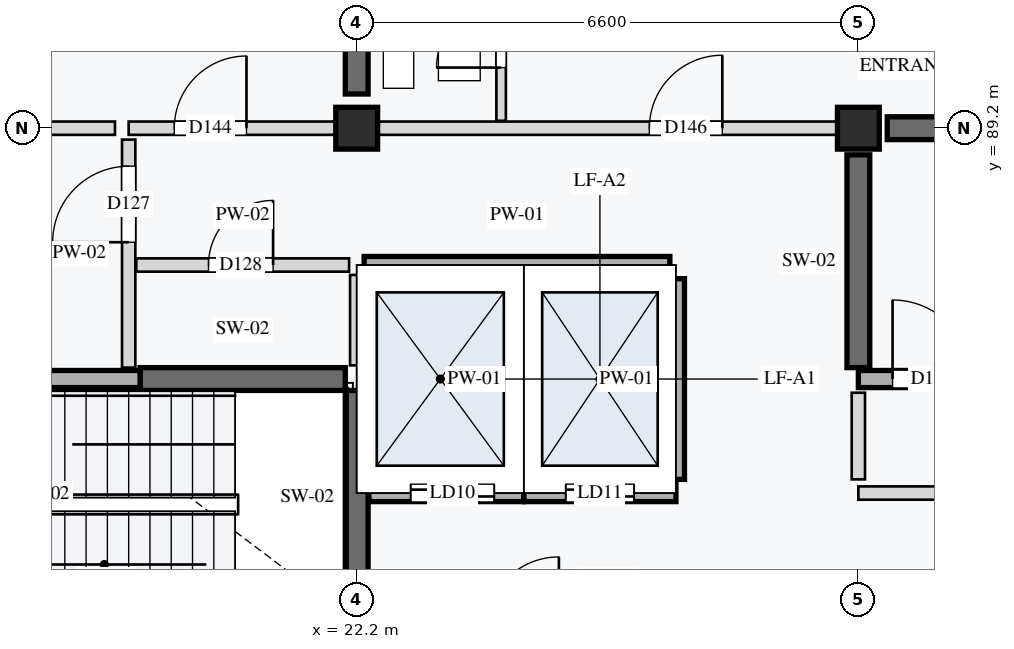
"""IFC4 building model, lengths in metres.
Left out: names, types, materials, properties, quantities, classifications, styles, units other than length and angle.
Written with IfcOpenShell. Run it as: python <this file> out.ifc"""

import sys

from ifc_helpers import new_model, si_unit, direction, frame, frame_2d, origin, origin_2d, place, context, subcontext, project, spatial, rectangle, extrude, element, fill, save


model = new_model("IFC4")
c1 = context("Model", 3, precision=1e-05, world=origin(), true_north=direction((0.0, 1.0)))
c2 = subcontext(c1, "Body", "Model", "MODEL_VIEW")
j1 = project(units=[si_unit("LENGTHUNIT", "METRE"), si_unit("PLANEANGLEUNIT", "RADIAN")], contexts=[c1])
p1 = place(None, origin())
s1 = spatial("IfcSite", under=j1, at=p1, CompositionType="ELEMENT")
p2 = place(p1, origin())
s2 = spatial("IfcBuilding", under=s1, at=p2, CompositionType="ELEMENT")
p3 = place(p2, frame((0.0, 0.0, 14.8)))
s3 = spatial("IfcBuildingStorey", under=s2, at=p3, CompositionType="ELEMENT", Elevation=14.8)
for number, where, z_axis, x_axis in (
    (1, (22.2, 89.2, 0.0), (0.0, 0.0, 1.0), (1.0, 0.0, 0.0)),
    (2, (28.8, 89.2, 0.0), (0.0, 0.0, 1.0), (1.0, 0.0, 0.0)),
):
    element("IfcColumn", number, at=place(p3, frame(where, z_axis=z_axis, x_axis=x_axis)), inside=s3, PredefinedType="COLUMN", context=c2, shape_type="SweptSolid", body=[
        extrude(rectangle(XDim=0.55, YDim=0.55, at=origin_2d()), origin(), (0.0, 0.0, 1.0), 3.2),
    ])
p4 = place(p3, frame((19.35, 85.9, 0.0), z_axis=(0.0, 0.0, 1.0), x_axis=(1.0, 0.0, 0.0)))
e3 = element("IfcWall", 3, at=p4, inside=s3, PredefinedType="SHEAR", context=c2, shape_type="SweptSolid", body=[
    extrude(rectangle(XDim=2.7, YDim=0.3, at=frame_2d((1.35, 0.0))), origin(), (0.0, 0.0, 1.0), 2.96),
])
p5 = place(p3, frame((22.2, 82.95, 0.0), z_axis=(0.0, 0.0, 1.0), x_axis=(0.0, 1.0, 0.0)))
e4 = element("IfcWall", 4, at=p5, inside=s3, PredefinedType="SHEAR", context=c2, shape_type="SweptSolid", body=[
    extrude(rectangle(XDim=2.8, YDim=0.3, at=frame_2d((1.4, 0.0))), origin(), (0.0, 0.0, 1.0), 2.96),
])
p6 = place(p3, frame((29.18, 89.2, 0.0), z_axis=(0.0, 0.0, 1.0), x_axis=(1.0, 0.0, 0.0)))
e5 = element("IfcWall", 5, at=p6, inside=s3, PredefinedType="SHEAR", context=c2, shape_type="SweptSolid", body=[
    extrude(rectangle(XDim=5.84, YDim=0.3, at=frame_2d((2.92, 0.0))), origin(), (0.0, 0.0, 1.0), 2.96),
])
p7 = place(p3, frame((28.8, 86.05, 0.0), z_axis=(0.0, 0.0, 1.0), x_axis=(0.0, 1.0, 0.0)))
e6 = element("IfcWall", 6, at=p7, inside=s3, PredefinedType="SHEAR", context=c2, shape_type="SweptSolid", body=[
    extrude(rectangle(XDim=2.8, YDim=0.3, at=frame_2d((1.4, 0.0))), origin(), (0.0, 0.0, 1.0), 2.96),
])
p8 = place(p3, frame((22.2, 89.65, 0.0), z_axis=(0.0, 0.0, 1.0), x_axis=(0.0, 1.0, 0.0)))
e7 = element("IfcWall", 7, at=p8, inside=s3, PredefinedType="SHEAR", context=c2, shape_type="SweptSolid", body=[
    extrude(rectangle(XDim=5.7, YDim=0.3, at=frame_2d((2.85, 0.0))), origin(), (0.0, 0.0, 1.0), 2.96),
])
p9 = place(p3, frame((15.75, 85.9, 0.0), z_axis=(0.0, 0.0, 1.0), x_axis=(1.0, 0.0, 0.0)))
e8 = element("IfcWall", 8, at=p9, inside=s3, PredefinedType="STANDARD", context=c2, shape_type="SweptSolid", body=[
    extrude(rectangle(XDim=3.6, YDim=0.225, at=frame_2d((1.8, 0.0))), origin(), (0.0, 0.0, 1.0), 2.96),
])
p10 = place(p9, frame((0.45, 0.0, 0.0)))
e9 = element("IfcOpeningElement", 9, at=p10, cuts=e8, PredefinedType="OPENING", context=c2, shape_type="SweptSolid", body=[
    extrude(rectangle(XDim=1.0, YDim=2.1, at=frame_2d((0.5, 1.05))), frame((0.0, 0.123, 0.0), z_axis=(0.0, -1.0, 0.0), x_axis=(1.0, 0.0, 0.0)), (0.0, 0.0, 1.0), 0.245),
])
p11 = place(p3, frame((19.2, 86.05, 0.0), z_axis=(0.0, 0.0, 1.0), x_axis=(0.0, 1.0, 0.0)))
e10 = element("IfcWall", 10, at=p11, inside=s3, PredefinedType="PARTITIONING", context=c2, shape_type="SweptSolid", body=[
    extrude(rectangle(XDim=3.0, YDim=0.175, at=frame_2d((1.5, 0.0))), origin(), (0.0, 0.0, 1.0), 2.96),
])
p12 = place(p11, frame((1.65, 0.0, 0.0)))
e11 = element("IfcOpeningElement", 11, at=p12, cuts=e10, PredefinedType="OPENING", context=c2, shape_type="SweptSolid", body=[
    extrude(rectangle(XDim=1.0, YDim=2.16, at=frame_2d((0.5, 1.08))), frame((0.0, 0.097, 0.0), z_axis=(0.0, -1.0, 0.0), x_axis=(1.0, 0.0, 0.0)), (0.0, 0.0, 1.0), 0.195),
])
p13 = place(p3, frame((19.3, 87.4, 0.0), z_axis=(0.0, 0.0, 1.0), x_axis=(1.0, 0.0, 0.0)))
e12 = element("IfcWall", 12, at=p13, inside=s3, PredefinedType="PARTITIONING", context=c2, shape_type="SweptSolid", body=[
    extrude(rectangle(XDim=2.8, YDim=0.175, at=frame_2d((1.4, 0.0))), origin(), (0.0, 0.0, 1.0), 2.96),
])
p14 = place(p13, frame((0.95, 0.0, 0.0)))
e13 = element("IfcOpeningElement", 13, at=p14, cuts=e12, PredefinedType="OPENING", context=c2, shape_type="SweptSolid", body=[
    extrude(rectangle(XDim=0.85, YDim=2.0, at=frame_2d((0.425, 1.0))), frame((0.0, 0.097, 0.0), z_axis=(0.0, -1.0, 0.0), x_axis=(1.0, 0.0, 0.0)), (0.0, 0.0, 1.0), 0.195),
])
p15 = place(p3, frame((22.2, 86.08, 0.0), z_axis=(0.0, 0.0, 1.0), x_axis=(0.0, 1.0, 0.0)))
e14 = element("IfcWall", 14, at=p15, inside=s3, PredefinedType="PARTITIONING", context=c2, shape_type="SweptSolid", body=[
    extrude(rectangle(XDim=1.19, YDim=0.175, at=frame_2d((0.595, 0.0))), origin(), (0.0, 0.0, 1.0), 2.96),
])
p16 = place(p3, frame((22.36, 84.4, 0.0), z_axis=(0.0, 0.0, 1.0), x_axis=(1.0, 0.0, 0.0)))
e15 = element("IfcWall", 15, at=p16, inside=s3, PredefinedType="STANDARD", context=c2, shape_type="SweptSolid", body=[
    extrude(rectangle(XDim=2.04, YDim=0.225, at=frame_2d((1.02, 0.0))), origin(), (0.0, 0.0, 1.0), 2.96),
])
p17 = place(p16, frame((0.55, 0.0, 0.0)))
e16 = element("IfcOpeningElement", 16, at=p17, cuts=e15, PredefinedType="OPENING", context=c2, shape_type="SweptSolid", body=[
    extrude(rectangle(XDim=1.1, YDim=2.1, at=frame_2d((0.55, 1.05))), frame((0.0, 0.123, 0.0), z_axis=(0.0, -1.0, 0.0), x_axis=(1.0, 0.0, 0.0)), (0.0, 0.0, 1.0), 0.245),
])
p18 = place(p3, frame((24.4, 84.4, 0.0), z_axis=(0.0, 0.0, 1.0), x_axis=(1.0, 0.0, 0.0)))
e17 = element("IfcWall", 17, at=p18, inside=s3, PredefinedType="STANDARD", context=c2, shape_type="SweptSolid", body=[
    extrude(rectangle(XDim=2.0, YDim=0.225, at=frame_2d((1.0, 0.0))), origin(), (0.0, 0.0, 1.0), 2.96),
])
p19 = place(p18, frame((0.55, 0.0, 0.0)))
e18 = element("IfcOpeningElement", 18, at=p19, cuts=e17, PredefinedType="OPENING", context=c2, shape_type="SweptSolid", body=[
    extrude(rectangle(XDim=0.9, YDim=2.1, at=frame_2d((0.45, 1.05))), frame((0.0, 0.123, 0.0), z_axis=(0.0, -1.0, 0.0), x_axis=(1.0, 0.0, 0.0)), (0.0, 0.0, 1.0), 0.245),
])
p20 = place(p3, frame((22.298, 87.4, 0.0), z_axis=(0.0, 0.0, 1.0), x_axis=(1.0, 0.0, 0.0)))
e19 = element("IfcWall", 19, at=p20, inside=s3, PredefinedType="STANDARD", context=c2, shape_type="SweptSolid", body=[
    extrude(rectangle(XDim=4.022, YDim=0.225, at=frame_2d((2.011, 0.0))), origin(), (0.0, 0.0, 1.0), 2.96),
])
for number, where, z_axis, x_axis in (
    (20, (24.4, 84.58, 0.0), (0.0, 0.0, 1.0), (0.0, 1.0, 0.0)),
    (21, (26.4, 84.58, 0.0), (0.0, 0.0, 1.0), (0.0, 1.0, 0.0)),
):
    element("IfcWall", number, at=place(p3, frame(where, z_axis=z_axis, x_axis=x_axis)), inside=s3, PredefinedType="STANDARD", context=c2, shape_type="SweptSolid", body=[
        extrude(rectangle(XDim=2.64, YDim=0.225, at=frame_2d((1.32, 0.0))), origin(), (0.0, 0.0, 1.0), 2.96),
    ])
p21 = place(p3, frame((28.8, 85.9, 0.0), z_axis=(0.0, 0.0, 1.0), x_axis=(1.0, 0.0, 0.0)))
e22 = element("IfcWall", 22, at=p21, inside=s3, PredefinedType="STANDARD", context=c2, shape_type="SweptSolid", body=[
    extrude(rectangle(XDim=3.45, YDim=0.225, at=frame_2d((1.725, 0.0))), origin(), (0.0, 0.0, 1.0), 2.96),
])
p22 = place(p21, frame((0.45, 0.0, 0.0)))
e23 = element("IfcOpeningElement", 23, at=p22, cuts=e22, PredefinedType="OPENING", context=c2, shape_type="SweptSolid", body=[
    extrude(rectangle(XDim=1.04, YDim=2.12, at=frame_2d((0.52, 1.06))), frame((0.0, 0.123, 0.0), z_axis=(0.0, -1.0, 0.0), x_axis=(1.0, 0.0, 0.0)), (0.0, 0.0, 1.0), 0.245),
])
p23 = place(p3, frame((28.8, 84.4, 0.0), z_axis=(0.0, 0.0, 1.0), x_axis=(1.0, 0.0, 0.0)))
e24 = element("IfcWall", 24, at=p23, inside=s3, PredefinedType="PARTITIONING", context=c2, shape_type="SweptSolid", body=[
    extrude(rectangle(XDim=3.3, YDim=0.175, at=frame_2d((1.65, 0.0))), origin(), (0.0, 0.0, 1.0), 2.96),
])
p24 = place(p23, frame((1.8, 0.0, 0.0)))
e25 = element("IfcOpeningElement", 25, at=p24, cuts=e24, PredefinedType="OPENING", context=c2, shape_type="SweptSolid", body=[
    extrude(rectangle(XDim=1.0, YDim=2.1, at=frame_2d((0.5, 1.05))), frame((0.0, 0.097, 0.0), z_axis=(0.0, -1.0, 0.0), x_axis=(1.0, 0.0, 0.0)), (0.0, 0.0, 1.0), 0.195),
])
p25 = place(p3, frame((28.8, 84.58, 0.0), z_axis=(0.0, 0.0, 1.0), x_axis=(0.0, 1.0, 0.0)))
e26 = element("IfcWall", 26, at=p25, inside=s3, PredefinedType="PARTITIONING", context=c2, shape_type="SweptSolid", body=[
    extrude(rectangle(XDim=1.14, YDim=0.175, at=frame_2d((0.57, 0.0))), origin(), (0.0, 0.0, 1.0), 2.96),
])
p26 = place(p3, frame((15.88, 89.2, 0.0), z_axis=(0.0, 0.0, 1.0), x_axis=(1.0, 0.0, 0.0)))
e27 = element("IfcWall", 27, at=p26, inside=s3, PredefinedType="PARTITIONING", context=c2, shape_type="SweptSolid", body=[
    extrude(rectangle(XDim=3.14, YDim=0.175, at=frame_2d((1.57, 0.0))), origin(), (0.0, 0.0, 1.0), 2.7),
])
p27 = place(p3, frame((19.2, 89.2, 0.0), z_axis=(0.0, 0.0, 1.0), x_axis=(1.0, 0.0, 0.0)))
e28 = element("IfcWall", 28, at=p27, inside=s3, PredefinedType="PARTITIONING", context=c2, shape_type="SweptSolid", body=[
    extrude(rectangle(XDim=3.0, YDim=0.175, at=frame_2d((1.5, 0.0))), origin(), (0.0, 0.0, 1.0), 2.7),
])
p28 = place(p27, frame((0.6, 0.0, 0.0)))
e29 = element("IfcOpeningElement", 29, at=p28, cuts=e28, PredefinedType="OPENING", context=c2, shape_type="SweptSolid", body=[
    extrude(rectangle(XDim=0.95, YDim=2.16, at=frame_2d((0.475, 1.08))), frame((0.0, 0.097, 0.0), z_axis=(0.0, -1.0, 0.0), x_axis=(1.0, 0.0, 0.0)), (0.0, 0.0, 1.0), 0.195),
])
p29 = place(p3, frame((22.2, 89.2, 0.0), z_axis=(0.0, 0.0, 1.0), x_axis=(1.0, 0.0, 0.0)))
e30 = element("IfcWall", 30, at=p29, inside=s3, PredefinedType="PARTITIONING", context=c2, shape_type="SweptSolid", body=[
    extrude(rectangle(XDim=6.6, YDim=0.175, at=frame_2d((3.3, 0.0))), origin(), (0.0, 0.0, 1.0), 2.7),
])
p30 = place(p29, frame((3.85, 0.0, 0.0)))
e31 = element("IfcOpeningElement", 31, at=p30, cuts=e30, PredefinedType="OPENING", context=c2, shape_type="SweptSolid", body=[
    extrude(rectangle(XDim=0.96, YDim=2.18, at=frame_2d((0.48, 1.09))), frame((0.0, 0.097, 0.0), z_axis=(0.0, -1.0, 0.0), x_axis=(1.0, 0.0, 0.0)), (0.0, 0.0, 1.0), 0.195),
])
p31 = place(p3, frame((24.1, 89.298, 0.0), z_axis=(0.0, 0.0, 1.0), x_axis=(0.0, 1.0, 0.0)))
e32 = element("IfcWall", 32, at=p31, inside=s3, PredefinedType="PARTITIONING", context=c2, shape_type="SweptSolid", body=[
    extrude(rectangle(XDim=2.302, YDim=0.125, at=frame_2d((1.151, 0.0))), origin(), (0.0, 0.0, 1.0), 2.96),
])
p32 = place(p31, frame((0.7, 0.0, 0.0)))
e33 = element("IfcOpeningElement", 33, at=p32, cuts=e32, PredefinedType="OPENING", context=c2, shape_type="SweptSolid", body=[
    extrude(rectangle(XDim=0.85, YDim=2.04, at=frame_2d((0.425, 1.02))), frame((0.0, 0.073, 0.0), z_axis=(0.0, -1.0, 0.0), x_axis=(1.0, 0.0, 0.0)), (0.0, 0.0, 1.0), 0.145),
])
p33 = place(p12, origin())
e34 = element("IfcDoor", 34, at=p33, inside=s3, OperationType="SINGLE_SWING_LEFT", PredefinedType="DOOR", context=c2, shape_type="SweptSolid", body=[
    extrude(rectangle(XDim=1.0, YDim=2.16, at=frame_2d((0.5, 1.08))), frame((0.0, 0.025, 0.0), z_axis=(0.0, -1.0, 0.0), x_axis=(1.0, 0.0, 0.0)), (0.0, 0.0, 1.0), 0.05),
])
fill(e11, e34)
p34 = place(p14, origin())
e35 = element("IfcDoor", 35, at=p34, inside=s3, OperationType="SINGLE_SWING_RIGHT", PredefinedType="DOOR", context=c2, shape_type="SweptSolid", body=[
    extrude(rectangle(XDim=0.85, YDim=2.0, at=frame_2d((0.425, 1.0))), frame((0.0, 0.025, 0.0), z_axis=(0.0, -1.0, 0.0), x_axis=(1.0, 0.0, 0.0)), (0.0, 0.0, 1.0), 0.05),
])
fill(e13, e35)
p35 = place(p17, origin())
e36 = element("IfcDoor", 36, at=p35, inside=s3, OperationType="DOUBLE_DOOR_SLIDING", PredefinedType="DOOR", context=c2, shape_type="SweptSolid", body=[
    extrude(rectangle(XDim=1.1, YDim=2.1, at=frame_2d((0.55, 1.05))), frame((0.0, 0.025, 0.0), z_axis=(0.0, -1.0, 0.0), x_axis=(1.0, 0.0, 0.0)), (0.0, 0.0, 1.0), 0.05),
])
fill(e16, e36)
p36 = place(p19, origin())
e37 = element("IfcDoor", 37, at=p36, inside=s3, OperationType="DOUBLE_DOOR_SLIDING", PredefinedType="DOOR", context=c2, shape_type="SweptSolid", body=[
    extrude(rectangle(XDim=0.9, YDim=2.1, at=frame_2d((0.45, 1.05))), frame((0.0, 0.025, 0.0), z_axis=(0.0, -1.0, 0.0), x_axis=(1.0, 0.0, 0.0)), (0.0, 0.0, 1.0), 0.05),
])
fill(e18, e37)
p37 = place(p22, origin())
e38 = element("IfcDoor", 38, at=p37, inside=s3, OperationType="SINGLE_SWING_LEFT", PredefinedType="DOOR", context=c2, shape_type="SweptSolid", body=[
    extrude(rectangle(XDim=1.04, YDim=2.12, at=frame_2d((0.52, 1.06))), frame((0.0, 0.025, 0.0), z_axis=(0.0, -1.0, 0.0), x_axis=(1.0, 0.0, 0.0)), (0.0, 0.0, 1.0), 0.05),
])
fill(e23, e38)
p38 = place(p28, origin())
e39 = element("IfcDoor", 39, at=p38, inside=s3, OperationType="SINGLE_SWING_RIGHT", PredefinedType="DOOR", context=c2, shape_type="SweptSolid", body=[
    extrude(rectangle(XDim=0.95, YDim=2.16, at=frame_2d((0.475, 1.08))), frame((0.0, 0.025, 0.0), z_axis=(0.0, -1.0, 0.0), x_axis=(1.0, 0.0, 0.0)), (0.0, 0.0, 1.0), 0.05),
])
fill(e29, e39)
p39 = place(p30, origin())
e40 = element("IfcDoor", 40, at=p39, inside=s3, OperationType="SINGLE_SWING_RIGHT", PredefinedType="DOOR", context=c2, shape_type="SweptSolid", body=[
    extrude(rectangle(XDim=0.96, YDim=2.18, at=frame_2d((0.48, 1.09))), frame((0.0, 0.025, 0.0), z_axis=(0.0, -1.0, 0.0), x_axis=(1.0, 0.0, 0.0)), (0.0, 0.0, 1.0), 0.05),
])
fill(e31, e40)
p40 = place(p32, origin())
e41 = element("IfcDoor", 41, at=p40, inside=s3, OperationType="SINGLE_SWING_LEFT", PredefinedType="DOOR", context=c2, shape_type="SweptSolid", body=[
    extrude(rectangle(XDim=0.85, YDim=2.04, at=frame_2d((0.425, 1.02))), frame((0.0, 0.025, 0.0), z_axis=(0.0, -1.0, 0.0), x_axis=(1.0, 0.0, 0.0)), (0.0, 0.0, 1.0), 0.05),
])
fill(e33, e41)
save(model, sys.argv[1])
